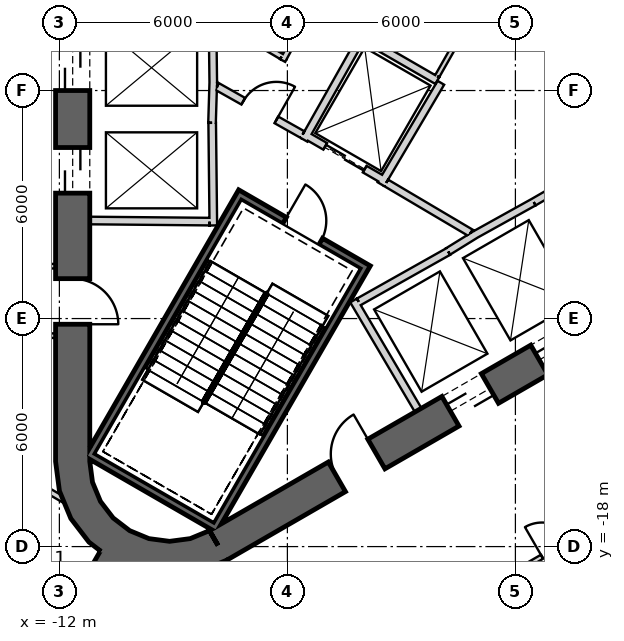
"""IFC4 building model, lengths in metres.
Left out: names, types, materials, properties, quantities, classifications, styles, units other than length and angle.
Written with IfcOpenShell. Run it as: python <this file> out.ifc"""

import sys

from ifc_helpers import new_model, si_unit, direction, frame, frame_2d, origin, place, context, subcontext, project, spatial, polyline, rectangle, outline, extrude, element, fill, save


model = new_model("IFC4")
c1 = context("Model", 3, precision=1e-05, world=origin(), true_north=direction((0.0, 1.0)))
c2 = subcontext(c1, "Body", "Model", "MODEL_VIEW")
j1 = project(units=[si_unit("LENGTHUNIT", "METRE"), si_unit("PLANEANGLEUNIT", "RADIAN")], contexts=[c1])
p1 = place(None, origin())
s1 = spatial("IfcSite", under=j1, at=p1, CompositionType="ELEMENT")
p2 = place(p1, origin())
s2 = spatial("IfcBuilding", under=s1, at=p2, CompositionType="ELEMENT")
p3 = place(p2, origin())
s3 = spatial("IfcBuildingStorey", under=s2, at=p3, CompositionType="ELEMENT", Elevation=0.0)
p4 = place(p3, frame((-11.65, 15.762, 0.0), z_axis=(0.0, 0.0, 1.0), x_axis=(0.0, -1.0, 0.0)))
e1 = element("IfcWall", 1, at=p4, inside=s3, PredefinedType="SHEAR", context=c2, shape_type="SweptSolid", body=[
    extrude(rectangle(XDim=31.523, YDim=0.9, at=frame_2d((15.762, 0.0))), origin(), (0.0, 0.0, 1.0), 9.0),
])
p5 = place(p4, frame((7.062, 0.0, 0.0)))
e2 = element("IfcOpeningElement", 2, at=p5, cuts=e1, PredefinedType="OPENING", context=c2, shape_type="SweptSolid", body=[
    extrude(rectangle(XDim=1.2, YDim=2.4, at=frame_2d((0.6, 1.2))), frame((0.0, 0.46, 0.0), z_axis=(0.0, -1.0, 0.0), x_axis=(1.0, 0.0, 0.0)), (0.0, 0.0, 1.0), 0.92),
])
p6 = place(p4, frame((9.762, 0.0, 0.0)))
e3 = element("IfcOpeningElement", 3, at=p6, cuts=e1, PredefinedType="OPENING", context=c2, shape_type="SweptSolid", body=[
    extrude(rectangle(XDim=1.2, YDim=2.4, at=frame_2d((0.6, 1.2))), frame((0.0, 0.46, 0.0), z_axis=(0.0, -1.0, 0.0), x_axis=(1.0, 0.0, 0.0)), (0.0, 0.0, 1.0), 0.92),
])
p7 = place(p4, frame((12.462, 0.0, 0.0)))
e4 = element("IfcOpeningElement", 4, at=p7, cuts=e1, PredefinedType="OPENING", context=c2, shape_type="SweptSolid", body=[
    extrude(rectangle(XDim=1.2, YDim=2.4, at=frame_2d((0.6, 1.2))), frame((0.0, 0.46, 0.0), z_axis=(0.0, -1.0, 0.0), x_axis=(1.0, 0.0, 0.0)), (0.0, 0.0, 1.0), 0.92),
])
p8 = place(p4, frame((15.162, 0.0, 0.0)))
e5 = element("IfcOpeningElement", 5, at=p8, cuts=e1, PredefinedType="OPENING", context=c2, shape_type="SweptSolid", body=[
    extrude(rectangle(XDim=1.2, YDim=2.4, at=frame_2d((0.6, 1.2))), frame((0.0, 0.46, 0.0), z_axis=(0.0, -1.0, 0.0), x_axis=(1.0, 0.0, 0.0)), (0.0, 0.0, 1.0), 0.92),
])
p9 = place(p4, frame((17.862, 0.0, 0.0)))
e6 = element("IfcOpeningElement", 6, at=p9, cuts=e1, PredefinedType="OPENING", context=c2, shape_type="SweptSolid", body=[
    extrude(rectangle(XDim=1.2, YDim=2.4, at=frame_2d((0.6, 1.2))), frame((0.0, 0.46, 0.0), z_axis=(0.0, -1.0, 0.0), x_axis=(1.0, 0.0, 0.0)), (0.0, 0.0, 1.0), 0.92),
])
p10 = place(p4, frame((20.562, 0.0, 0.0)))
e7 = element("IfcOpeningElement", 7, at=p10, cuts=e1, PredefinedType="OPENING", context=c2, shape_type="SweptSolid", body=[
    extrude(rectangle(XDim=1.2, YDim=2.4, at=frame_2d((0.6, 1.2))), frame((0.0, 0.46, 0.0), z_axis=(0.0, -1.0, 0.0), x_axis=(1.0, 0.0, 0.0)), (0.0, 0.0, 1.0), 0.92),
])
p11 = place(p4, frame((23.262, 0.0, 0.0)))
e8 = element("IfcOpeningElement", 8, at=p11, cuts=e1, PredefinedType="OPENING", context=c2, shape_type="SweptSolid", body=[
    extrude(rectangle(XDim=1.2, YDim=2.4, at=frame_2d((0.6, 1.2))), frame((0.0, 0.46, 0.0), z_axis=(0.0, -1.0, 0.0), x_axis=(1.0, 0.0, 0.0)), (0.0, 0.0, 1.0), 0.92),
])
p12 = place(p4, frame((3.612, 0.0, 0.0)))
e9 = element("IfcOpeningElement", 9, at=p12, cuts=e1, PredefinedType="OPENING", context=c2, shape_type="SweptSolid", body=[
    extrude(rectangle(XDim=1.2, YDim=2.4, at=frame_2d((0.6, 1.2))), frame((0.0, 0.46, 0.0), z_axis=(0.0, -1.0, 0.0), x_axis=(1.0, 0.0, 0.0)), (0.0, 0.0, 1.0), 0.92),
])
p13 = place(p4, frame((26.712, 0.0, 0.0)))
e10 = element("IfcOpeningElement", 10, at=p13, cuts=e1, PredefinedType="OPENING", context=c2, shape_type="SweptSolid", body=[
    extrude(rectangle(XDim=1.2, YDim=2.4, at=frame_2d((0.6, 1.2))), frame((0.0, 0.46, 0.0), z_axis=(0.0, -1.0, 0.0), x_axis=(1.0, 0.0, 0.0)), (0.0, 0.0, 1.0), 0.92),
])
p14 = place(p3, frame((-7.825, -17.97, 0.0), z_axis=(0.0, 0.0, 1.0), x_axis=(0.866028369851, 0.499994862586, 0.0)))
e11 = element("IfcWall", 11, at=p14, inside=s3, PredefinedType="SHEAR", context=c2, shape_type="SweptSolid", body=[
    extrude(rectangle(XDim=31.523, YDim=0.9, at=frame_2d((15.762, 0.0))), origin(), (0.0, 0.0, 1.0), 9.0),
])
p15 = place(p14, frame((7.062, 0.0, 0.0)))
e12 = element("IfcOpeningElement", 12, at=p15, cuts=e11, PredefinedType="OPENING", context=c2, shape_type="SweptSolid", body=[
    extrude(rectangle(XDim=1.2, YDim=2.4, at=frame_2d((0.6, 1.2))), frame((0.0, 0.46, 0.0), z_axis=(0.0, -1.0, 0.0), x_axis=(1.0, 0.0, 0.0)), (0.0, 0.0, 1.0), 0.92),
])
p16 = place(p14, frame((9.762, 0.0, 0.0)))
e13 = element("IfcOpeningElement", 13, at=p16, cuts=e11, PredefinedType="OPENING", context=c2, shape_type="SweptSolid", body=[
    extrude(rectangle(XDim=1.2, YDim=2.4, at=frame_2d((0.6, 1.2))), frame((0.0, 0.46, 0.0), z_axis=(0.0, -1.0, 0.0), x_axis=(1.0, 0.0, 0.0)), (0.0, 0.0, 1.0), 0.92),
])
p17 = place(p14, frame((12.462, 0.0, 0.0)))
e14 = element("IfcOpeningElement", 14, at=p17, cuts=e11, PredefinedType="OPENING", context=c2, shape_type="SweptSolid", body=[
    extrude(rectangle(XDim=1.2, YDim=2.4, at=frame_2d((0.6, 1.2))), frame((0.0, 0.46, 0.0), z_axis=(0.0, -1.0, 0.0), x_axis=(1.0, 0.0, 0.0)), (0.0, 0.0, 1.0), 0.92),
])
p18 = place(p14, frame((15.162, 0.0, 0.0)))
e15 = element("IfcOpeningElement", 15, at=p18, cuts=e11, PredefinedType="OPENING", context=c2, shape_type="SweptSolid", body=[
    extrude(rectangle(XDim=1.2, YDim=2.4, at=frame_2d((0.6, 1.2))), frame((0.0, 0.46, 0.0), z_axis=(0.0, -1.0, 0.0), x_axis=(1.0, 0.0, 0.0)), (0.0, 0.0, 1.0), 0.92),
])
p19 = place(p14, frame((17.862, 0.0, 0.0)))
e16 = element("IfcOpeningElement", 16, at=p19, cuts=e11, PredefinedType="OPENING", context=c2, shape_type="SweptSolid", body=[
    extrude(rectangle(XDim=1.2, YDim=2.4, at=frame_2d((0.6, 1.2))), frame((0.0, 0.46, 0.0), z_axis=(0.0, -1.0, 0.0), x_axis=(1.0, 0.0, 0.0)), (0.0, 0.0, 1.0), 0.92),
])
p20 = place(p14, frame((20.562, 0.0, 0.0)))
e17 = element("IfcOpeningElement", 17, at=p20, cuts=e11, PredefinedType="OPENING", context=c2, shape_type="SweptSolid", body=[
    extrude(rectangle(XDim=1.2, YDim=2.4, at=frame_2d((0.6, 1.2))), frame((0.0, 0.46, 0.0), z_axis=(0.0, -1.0, 0.0), x_axis=(1.0, 0.0, 0.0)), (0.0, 0.0, 1.0), 0.92),
])
p21 = place(p14, frame((26.712, 0.0, 0.0)))
e18 = element("IfcOpeningElement", 18, at=p21, cuts=e11, PredefinedType="OPENING", context=c2, shape_type="SweptSolid", body=[
    extrude(rectangle(XDim=1.2, YDim=2.4, at=frame_2d((0.6, 1.2))), frame((0.0, 0.46, 0.0), z_axis=(0.0, -1.0, 0.0), x_axis=(1.0, 0.0, 0.0)), (0.0, 0.0, 1.0), 0.92),
])
p22 = place(p14, frame((3.612, 0.0, 0.0)))
e19 = element("IfcOpeningElement", 19, at=p22, cuts=e11, PredefinedType="OPENING", context=c2, shape_type="SweptSolid", body=[
    extrude(rectangle(XDim=1.2, YDim=2.4, at=frame_2d((0.6, 1.2))), frame((0.0, 0.46, 0.0), z_axis=(0.0, -1.0, 0.0), x_axis=(1.0, 0.0, 0.0)), (0.0, 0.0, 1.0), 0.92),
])
p23 = place(p3, origin())
e20 = element("IfcWall", 20, at=p23, inside=s3, PredefinedType="SHEAR", context=c2, shape_type="SweptSolid", body=[
    extrude(outline(polyline([(-12.1, -15.762), (-11.998, -16.538), (-11.698, -17.262), (-11.221, -17.883), (-10.6, -18.36), (-9.876, -18.659), (-9.1, -18.762), (-8.323, -18.659), (-7.6, -18.36), (-8.05, -17.58), (-8.556, -17.79), (-9.1, -17.862), (-9.644, -17.79), (-10.15, -17.58), (-10.585, -17.247), (-10.919, -16.812), (-11.128, -16.305), (-11.2, -15.762), (-12.1, -15.762)])), origin(), (0.0, 0.0, 1.0), 9.0),
])
p24 = place(p3, frame((-10.575, -18.316, 0.0), z_axis=(0.0, 0.0, 1.0), x_axis=(-0.499996575515, -0.866027380903, 0.0)))
e21 = element("IfcWall", 21, at=p24, inside=s3, PredefinedType="SHEAR", context=c2, shape_type="SweptSolid", body=[
    extrude(rectangle(XDim=13.954, YDim=0.8, at=frame_2d((6.977, 0.0))), origin(), (0.0, 0.0, 1.0), 9.0),
])
p25 = place(p24, frame((1.7, 0.0, 0.0)))
e22 = element("IfcOpeningElement", 22, at=p25, cuts=e21, PredefinedType="OPENING", context=c2, shape_type="SweptSolid", body=[
    extrude(rectangle(XDim=1.4, YDim=2.4, at=frame_2d((0.7, 1.2))), frame((0.0, 0.41, 0.0), z_axis=(0.0, -1.0, 0.0), x_axis=(1.0, 0.0, 0.0)), (0.0, 0.0, 1.0), 0.82),
])
p26 = place(p3, frame((-7.95, -5.772, 0.0), z_axis=(0.0, 0.0, 1.0), x_axis=(-0.030803413295, -0.999525462272, 0.0)))
e23 = element("IfcWall", 23, at=p26, inside=s3, PredefinedType="PLUMBINGWALL", context=c2, shape_type="SweptSolid", body=[
    extrude(rectangle(XDim=1.078, YDim=0.2, at=frame_2d((0.539, 0.0))), origin(), (0.0, 0.0, 1.0), 8.7),
])
p27 = place(p3, frame((-7.971, -4.05, 0.0), z_axis=(0.0, 0.0, 1.0), x_axis=(0.012042535896, -0.999927486035, 0.0)))
e24 = element("IfcWall", 24, at=p27, inside=s3, PredefinedType="PLUMBINGWALL", context=c2, shape_type="SweptSolid", body=[
    extrude(rectangle(XDim=1.845, YDim=0.2, at=frame_2d((0.922, 0.0))), origin(), (0.0, 0.0, 1.0), 8.7),
])
p28 = place(p3, frame((-7.979, -6.85, 0.0), z_axis=(0.0, 0.0, 1.0), x_axis=(0.011121475088, -0.999938154483, 0.0)))
e25 = element("IfcWall", 25, at=p28, inside=s3, PredefinedType="PLUMBINGWALL", context=c2, shape_type="SweptSolid", body=[
    extrude(rectangle(XDim=2.7, YDim=0.2, at=frame_2d((1.35, 0.0))), origin(), (0.0, 0.0, 1.0), 8.7),
])
p29 = place(p3, frame((-8.05, -9.449, 0.0), z_axis=(0.0, 0.0, 1.0), x_axis=(-0.999957467379, 0.009222983926, 0.0)))
e26 = element("IfcWall", 26, at=p29, inside=s3, PredefinedType="PLUMBINGWALL", context=c2, shape_type="SweptSolid", body=[
    extrude(rectangle(XDim=3.15, YDim=0.2, at=frame_2d((1.575, 0.0))), origin(), (0.0, 0.0, 1.0), 8.7),
])
p30 = place(p3, frame((0.483, -8.936, 0.0), z_axis=(0.0, 0.0, 1.0), x_axis=(0.866030989016, 0.499990325971, 0.0)))
e27 = element("IfcWall", 27, at=p30, inside=s3, PredefinedType="PLUMBINGWALL", context=c2, shape_type="SweptSolid", body=[
    extrude(rectangle(XDim=8.1, YDim=0.2, at=frame_2d((4.05, 0.0))), origin(), (0.0, 0.0, 1.0), 8.7),
])
p31 = place(p3, frame((-2.558, -14.409, 0.0), z_axis=(0.0, 0.0, 1.0), x_axis=(-0.507997497166, 0.861358544901, 0.0)))
e28 = element("IfcWall", 28, at=p31, inside=s3, PredefinedType="PLUMBINGWALL", context=c2, shape_type="SweptSolid", body=[
    extrude(rectangle(XDim=3.35, YDim=0.2, at=frame_2d((1.675, 0.0))), origin(), (0.0, 0.0, 1.0), 8.7),
])
p32 = place(p3, frame((-1.769, -10.237, 0.0), z_axis=(0.0, 0.0, 1.0), x_axis=(-0.871534483978, -0.490334215854, 0.0)))
e29 = element("IfcWall", 29, at=p32, inside=s3, PredefinedType="PLUMBINGWALL", context=c2, shape_type="SweptSolid", body=[
    extrude(rectangle(XDim=2.7, YDim=0.2, at=frame_2d((1.35, 0.0))), origin(), (0.0, 0.0, 1.0), 8.7),
])
p33 = place(p3, frame((-1.024, -9.771, 0.0), z_axis=(0.0, 0.0, 1.0), x_axis=(-0.850348075135, -0.526220629693, 0.0)))
e30 = element("IfcWall", 30, at=p33, inside=s3, PredefinedType="PLUMBINGWALL", context=c2, shape_type="SweptSolid", body=[
    extrude(rectangle(XDim=0.878, YDim=0.2, at=frame_2d((0.439, 0.0))), origin(), (0.0, 0.0, 1.0), 8.7),
])
p34 = place(p3, frame((-1.13, -9.831, 0.0), z_axis=(0.0, 0.0, 1.0), x_axis=(0.874269620932, 0.485440655401, 0.0)))
e31 = element("IfcWall", 31, at=p34, inside=s3, PredefinedType="PLUMBINGWALL", context=c2, shape_type="SweptSolid", body=[
    extrude(rectangle(XDim=1.845, YDim=0.2, at=frame_2d((0.922, 0.0))), origin(), (0.0, 0.0, 1.0), 8.7),
])
p35 = place(p3, frame((-3.905, -10.563, -0.4), z_axis=(0.0, 0.0, 1.0), x_axis=(-0.500012932018, -0.866017937352, 0.0)))
e32 = element("IfcWall", 32, at=p35, inside=s3, PredefinedType="SHEAR", context=c2, shape_type="SweptSolid", body=[
    extrude(rectangle(XDim=8.1, YDim=0.2, at=frame_2d((4.05, 0.0))), origin(), (0.0, 0.0, 1.0), 9.1),
])
p36 = place(p3, frame((-11.282, -15.541, -0.4), z_axis=(0.0, 0.0, 1.0), x_axis=(0.866000483506, -0.500043160704, 0.0)))
e33 = element("IfcWall", 33, at=p36, inside=s3, PredefinedType="SHEAR", context=c2, shape_type="SweptSolid", body=[
    extrude(rectangle(XDim=3.8, YDim=0.2, at=frame_2d((1.9, 0.0))), origin(), (0.0, 0.0, 1.0), 9.1),
])
p37 = place(p3, frame((-7.196, -8.663, -0.4), z_axis=(0.0, 0.0, 1.0), x_axis=(-0.499997992926, -0.866026562566, 0.0)))
e34 = element("IfcWall", 34, at=p37, inside=s3, PredefinedType="SHEAR", context=c2, shape_type="SweptSolid", body=[
    extrude(rectangle(XDim=7.9, YDim=0.2, at=frame_2d((3.95, 0.0))), origin(), (0.0, 0.0, 1.0), 9.1),
])
p38 = place(p3, frame((-4.041, -10.599, -0.4), z_axis=(0.0, 0.0, 1.0), x_axis=(-0.866047807691, 0.499961193289, 0.0)))
e35 = element("IfcWall", 35, at=p38, inside=s3, PredefinedType="SHEAR", context=c2, shape_type="SweptSolid", body=[
    extrude(rectangle(XDim=3.6, YDim=0.2, at=frame_2d((1.8, 0.0))), origin(), (0.0, 0.0, 1.0), 9.1),
])
p39 = place(p38, frame((1.25, 0.0, 0.4)))
e36 = element("IfcOpeningElement", 36, at=p39, cuts=e35, PredefinedType="OPENING", context=c2, shape_type="SweptSolid", body=[
    extrude(rectangle(XDim=1.1, YDim=2.1, at=frame_2d((0.55, 1.05))), frame((0.0, 0.11, 0.0), z_axis=(0.0, -1.0, 0.0), x_axis=(1.0, 0.0, 0.0)), (0.0, 0.0, 1.0), 0.22),
])
p40 = place(p3, frame((-3.446, -8.368, 0.0), z_axis=(0.0, 0.0, 1.0), x_axis=(-0.866024647952, 0.500001309137, 0.0)))
e37 = element("IfcWall", 37, at=p40, inside=s3, PredefinedType="PLUMBINGWALL", context=c2, shape_type="SweptSolid", body=[
    extrude(rectangle(XDim=2.4, YDim=0.2, at=frame_2d((1.2, 0.0))), origin(), (0.0, 0.0, 1.0), 8.7),
])
p41 = place(p40, frame((0.6, 0.0, 0.0)))
e38 = element("IfcOpeningElement", 38, at=p41, cuts=e37, PredefinedType="OPENING", context=c2, shape_type="SweptSolid", body=[
    extrude(rectangle(XDim=1.2, YDim=2.4, at=frame_2d((0.6, 1.2))), frame((0.0, 0.11, 0.0), z_axis=(0.0, -1.0, 0.0), x_axis=(1.0, 0.0, 0.0)), (0.0, 0.0, 1.0), 0.22),
])
p42 = place(p3, frame((-1.961, -5.796, 0.0), z_axis=(0.0, 0.0, 1.0), x_axis=(-0.508647062354, -0.860975125052, 0.0)))
e39 = element("IfcWall", 39, at=p42, inside=s3, PredefinedType="PLUMBINGWALL", context=c2, shape_type="SweptSolid", body=[
    extrude(rectangle(XDim=3.1, YDim=0.2, at=frame_2d((1.55, 0.0))), origin(), (0.0, 0.0, 1.0), 8.7),
])
p43 = place(p3, frame((-3.99, -4.509, 0.0), z_axis=(0.0, 0.0, 1.0), x_axis=(-0.491358283181, -0.870957540612, 0.0)))
e40 = element("IfcWall", 40, at=p43, inside=s3, PredefinedType="PLUMBINGWALL", context=c2, shape_type="SweptSolid", body=[
    extrude(rectangle(XDim=3.2, YDim=0.2, at=frame_2d((1.6, 0.0))), origin(), (0.0, 0.0, 1.0), 8.7),
])
p44 = place(p3, frame((-3.953, -4.646, 0.0), z_axis=(0.0, 0.0, 1.0), x_axis=(0.866038900241, -0.499976622722, 0.0)))
e41 = element("IfcWall", 41, at=p44, inside=s3, PredefinedType="PLUMBINGWALL", context=c2, shape_type="SweptSolid", body=[
    extrude(rectangle(XDim=2.189, YDim=0.2, at=frame_2d((1.095, 0.0))), origin(), (0.0, 0.0, 1.0), 8.7),
])
p45 = place(p3, frame((-3.401, -8.43, 0.0), z_axis=(0.0, 0.0, 1.0), x_axis=(0.860615607571, -0.509255118781, 0.0)))
e42 = element("IfcWall", 42, at=p45, inside=s3, PredefinedType="PARTITIONING", context=c2, shape_type="SweptSolid", body=[
    extrude(rectangle(XDim=2.581, YDim=0.2, at=frame_2d((1.29, 0.0))), origin(), (0.0, 0.0, 1.0), 8.7),
])
p46 = place(p3, frame((-7.849, -5.894, 0.0), z_axis=(0.0, 0.0, 1.0), x_axis=(0.871363259478, -0.490638431059, 0.0)))
e43 = element("IfcWall", 43, at=p46, inside=s3, PredefinedType="PARTITIONING", context=c2, shape_type="SweptSolid", body=[
    extrude(rectangle(XDim=2.581, YDim=0.2, at=frame_2d((1.291, 0.0))), origin(), (0.0, 0.0, 1.0), 8.7),
])
p47 = place(p46, frame((0.791, 0.0, 0.0)))
e44 = element("IfcOpeningElement", 44, at=p47, cuts=e43, PredefinedType="OPENING", context=c2, shape_type="SweptSolid", body=[
    extrude(rectangle(XDim=1.0, YDim=2.1, at=frame_2d((0.5, 1.05))), frame((0.0, 0.11, 0.0), z_axis=(0.0, -1.0, 0.0), x_axis=(1.0, 0.0, 0.0)), (0.0, 0.0, 1.0), 0.22),
])
p48 = place(p3, frame((0.094, -1.836, 0.0), z_axis=(0.0, 0.0, 1.0), x_axis=(-0.494097972448, -0.869406230495, 0.0)))
e45 = element("IfcWall", 45, at=p48, inside=s3, PredefinedType="PARTITIONING", context=c2, shape_type="SweptSolid", body=[
    extrude(rectangle(XDim=4.357, YDim=0.12, at=frame_2d((2.179, 0.0))), origin(), (0.0, 0.0, 1.0), 8.7),
])
p49 = place(p48, frame((1.83, 0.0, 0.0)))
e46 = element("IfcOpeningElement", 46, at=p49, cuts=e45, PredefinedType="OPENING", context=c2, shape_type="SweptSolid", body=[
    extrude(rectangle(XDim=0.8, YDim=2.1, at=frame_2d((0.4, 1.05))), frame((0.0, 0.07, 0.0), z_axis=(0.0, -1.0, 0.0), x_axis=(1.0, 0.0, 0.0)), (0.0, 0.0, 1.0), 0.14),
])
p50 = place(p3, frame((-6.124, -5.211, 0.0), z_axis=(0.0, 0.0, 1.0), x_axis=(0.476228984866, 0.879321303036, 0.0)))
e47 = element("IfcWall", 47, at=p50, inside=s3, PredefinedType="PLUMBINGWALL", context=c2, shape_type="SweptSolid", body=[
    extrude(rectangle(XDim=1.162, YDim=0.15, at=frame_2d((0.581, 0.0))), origin(), (0.0, 0.0, 1.0), 8.7),
])
p51 = place(p3, frame((-7.95, -4.041, 0.0), z_axis=(0.0, 0.0, 1.0), x_axis=(0.860090281069, -0.510141851263, 0.0)))
e48 = element("IfcWall", 48, at=p51, inside=s3, PredefinedType="PLUMBINGWALL", context=c2, shape_type="SweptSolid", body=[
    extrude(rectangle(XDim=2.089, YDim=0.15, at=frame_2d((1.045, 0.0))), origin(), (0.0, 0.0, 1.0), 8.7),
])
p52 = place(p3, frame((-4.276, -21.14, 0.0), z_axis=(0.0, 0.0, 1.0), x_axis=(0.866026219638, 0.499998586897, 0.0)))
e49 = element("IfcWall", 49, at=p52, inside=s3, PredefinedType="PARTITIONING", context=c2, shape_type="SweptSolid", body=[
    extrude(rectangle(XDim=28.547, YDim=0.12, at=frame_2d((14.273, 0.0))), origin(), (0.0, 0.0, 1.0), 8.7),
])
p53 = place(p52, frame((20.947, 0.0, 0.0)))
e50 = element("IfcOpeningElement", 50, at=p53, cuts=e49, PredefinedType="OPENING", context=c2, shape_type="SweptSolid", body=[
    extrude(rectangle(XDim=1.8, YDim=2.1, at=frame_2d((0.9, 1.05))), frame((0.0, 0.07, 0.0), z_axis=(0.0, -1.0, 0.0), x_axis=(1.0, 0.0, 0.0)), (0.0, 0.0, 1.0), 0.14),
])
p54 = place(p52, frame((13.347, 0.0, 0.0)))
e51 = element("IfcOpeningElement", 51, at=p54, cuts=e49, PredefinedType="OPENING", context=c2, shape_type="SweptSolid", body=[
    extrude(rectangle(XDim=1.8, YDim=2.1, at=frame_2d((0.9, 1.05))), frame((0.0, 0.07, 0.0), z_axis=(0.0, -1.0, 0.0), x_axis=(1.0, 0.0, 0.0)), (0.0, 0.0, 1.0), 0.14),
])
p55 = place(p52, frame((5.747, 0.0, 0.0)))
e52 = element("IfcOpeningElement", 52, at=p55, cuts=e49, PredefinedType="OPENING", context=c2, shape_type="SweptSolid", body=[
    extrude(rectangle(XDim=1.8, YDim=2.1, at=frame_2d((0.9, 1.05))), frame((0.0, 0.07, 0.0), z_axis=(0.0, -1.0, 0.0), x_axis=(1.0, 0.0, 0.0)), (0.0, 0.0, 1.0), 0.14),
])
p56 = place(p3, frame((-13.481, -10.65, 0.0), z_axis=(0.0, 0.0, 1.0), x_axis=(0.999759933767, 0.021910610072, 0.0)))
e53 = element("IfcWall", 53, at=p56, inside=s3, PredefinedType="PARTITIONING", context=c2, shape_type="SweptSolid", body=[
    extrude(rectangle(XDim=1.382, YDim=0.12, at=frame_2d((0.691, 0.0))), origin(), (0.0, 0.0, 1.0), 8.7),
])
p57 = place(p3, frame((-11.729, -16.86, 0.0), z_axis=(0.0, 0.0, 1.0), x_axis=(-0.864161643102, 0.503214322721, 0.0)))
e54 = element("IfcWall", 54, at=p57, inside=s3, PredefinedType="PLUMBINGWALL", context=c2, shape_type="SweptSolid", body=[
    extrude(rectangle(XDim=5.086, YDim=0.15, at=frame_2d((2.543, 0.0))), origin(), (0.0, 0.0, 1.0), 7.78),
])
p58 = place(p3, frame((-12.07, -12.45, 0.0), z_axis=(0.0, 0.0, 1.0), x_axis=(-1.0, 0.0, 0.0)))
e55 = element("IfcWall", 55, at=p58, inside=s3, PredefinedType="PARTITIONING", context=c2, shape_type="SweptSolid", body=[
    extrude(rectangle(XDim=0.977, YDim=0.12, at=frame_2d((0.488, 0.0))), origin(), (0.0, 0.0, 1.0), 7.88),
])
p59 = place(p39, origin())
e56 = element("IfcDoor", 56, at=p59, inside=s3, OperationType="SINGLE_SWING_RIGHT", PredefinedType="USERDEFINED", context=c2, shape_type="SweptSolid", body=[
    extrude(rectangle(XDim=1.1, YDim=2.1, at=frame_2d((0.55, 1.05))), frame((0.0, 0.025, 0.0), z_axis=(0.0, -1.0, 0.0), x_axis=(1.0, 0.0, 0.0)), (0.0, 0.0, 1.0), 0.05),
])
fill(e36, e56)
p60 = place(p47, origin())
e57 = element("IfcDoor", 57, at=p60, inside=s3, OperationType="SINGLE_SWING_RIGHT", PredefinedType="USERDEFINED", context=c2, shape_type="SweptSolid", body=[
    extrude(rectangle(XDim=1.0, YDim=2.1, at=frame_2d((0.5, 1.05))), frame((0.0, 0.025, 0.0), z_axis=(0.0, -1.0, 0.0), x_axis=(1.0, 0.0, 0.0)), (0.0, 0.0, 1.0), 0.05),
])
fill(e44, e57)
p61 = place(p41, origin())
e58 = element("IfcDoor", 58, at=p61, inside=s3, OperationType="SLIDING_TO_LEFT", PredefinedType="USERDEFINED", context=c2, shape_type="SweptSolid", body=[
    extrude(rectangle(XDim=1.2, YDim=2.4, at=frame_2d((0.6, 1.2))), frame((0.0, 0.025, 0.0), z_axis=(0.0, -1.0, 0.0), x_axis=(1.0, 0.0, 0.0)), (0.0, 0.0, 1.0), 0.05),
])
fill(e38, e58)
p62 = place(p55, origin())
e59 = element("IfcDoor", 59, at=p62, inside=s3, OperationType="DOUBLE_DOOR_SINGLE_SWING", PredefinedType="NOTDEFINED", context=c2, shape_type="SweptSolid", body=[
    extrude(rectangle(XDim=1.8, YDim=2.1, at=frame_2d((0.9, 1.05))), frame((0.0, 0.025, 0.0), z_axis=(0.0, -1.0, 0.0), x_axis=(1.0, 0.0, 0.0)), (0.0, 0.0, 1.0), 0.05),
])
fill(e52, e59)
p63 = place(p10, origin())
e60 = element("IfcDoor", 60, at=p63, inside=s3, OperationType="SLIDING_TO_LEFT", PredefinedType="USERDEFINED", context=c2, shape_type="SweptSolid", body=[
    extrude(rectangle(XDim=1.2, YDim=2.4, at=frame_2d((0.6, 1.2))), frame((0.0, 0.025, 0.0), z_axis=(0.0, -1.0, 0.0), x_axis=(1.0, 0.0, 0.0)), (0.0, 0.0, 1.0), 0.05),
])
fill(e7, e60)
p64 = place(p11, origin())
e61 = element("IfcDoor", 61, at=p64, inside=s3, OperationType="SLIDING_TO_LEFT", PredefinedType="USERDEFINED", context=c2, shape_type="SweptSolid", body=[
    extrude(rectangle(XDim=1.2, YDim=2.4, at=frame_2d((0.6, 1.2))), frame((0.0, 0.025, 0.0), z_axis=(0.0, -1.0, 0.0), x_axis=(1.0, 0.0, 0.0)), (0.0, 0.0, 1.0), 0.05),
])
fill(e8, e61)
p65 = place(p15, origin())
e62 = element("IfcDoor", 62, at=p65, inside=s3, OperationType="SLIDING_TO_LEFT", PredefinedType="USERDEFINED", context=c2, shape_type="SweptSolid", body=[
    extrude(rectangle(XDim=1.2, YDim=2.4, at=frame_2d((0.6, 1.2))), frame((0.0, 0.025, 0.0), z_axis=(0.0, -1.0, 0.0), x_axis=(1.0, 0.0, 0.0)), (0.0, 0.0, 1.0), 0.05),
])
fill(e12, e62)
p66 = place(p16, origin())
e63 = element("IfcDoor", 63, at=p66, inside=s3, OperationType="SLIDING_TO_LEFT", PredefinedType="USERDEFINED", context=c2, shape_type="SweptSolid", body=[
    extrude(rectangle(XDim=1.2, YDim=2.4, at=frame_2d((0.6, 1.2))), frame((0.0, 0.025, 0.0), z_axis=(0.0, -1.0, 0.0), x_axis=(1.0, 0.0, 0.0)), (0.0, 0.0, 1.0), 0.05),
])
fill(e13, e63)
p67 = place(p13, origin())
e64 = element("IfcDoor", 64, at=p67, inside=s3, OperationType="SINGLE_SWING_RIGHT", PredefinedType="USERDEFINED", context=c2, shape_type="SweptSolid", body=[
    extrude(rectangle(XDim=1.2, YDim=2.4, at=frame_2d((0.6, 1.2))), frame((0.0, 0.025, 0.0), z_axis=(0.0, -1.0, 0.0), x_axis=(1.0, 0.0, 0.0)), (0.0, 0.0, 1.0), 0.05),
])
fill(e10, e64)
p68 = place(p22, origin())
e65 = element("IfcDoor", 65, at=p68, inside=s3, OperationType="SINGLE_SWING_RIGHT", PredefinedType="USERDEFINED", context=c2, shape_type="SweptSolid", body=[
    extrude(rectangle(XDim=1.2, YDim=2.4, at=frame_2d((0.6, 1.2))), frame((0.0, 0.025, 0.0), z_axis=(0.0, -1.0, 0.0), x_axis=(1.0, 0.0, 0.0)), (0.0, 0.0, 1.0), 0.05),
])
fill(e19, e65)
save(model, sys.argv[1])
